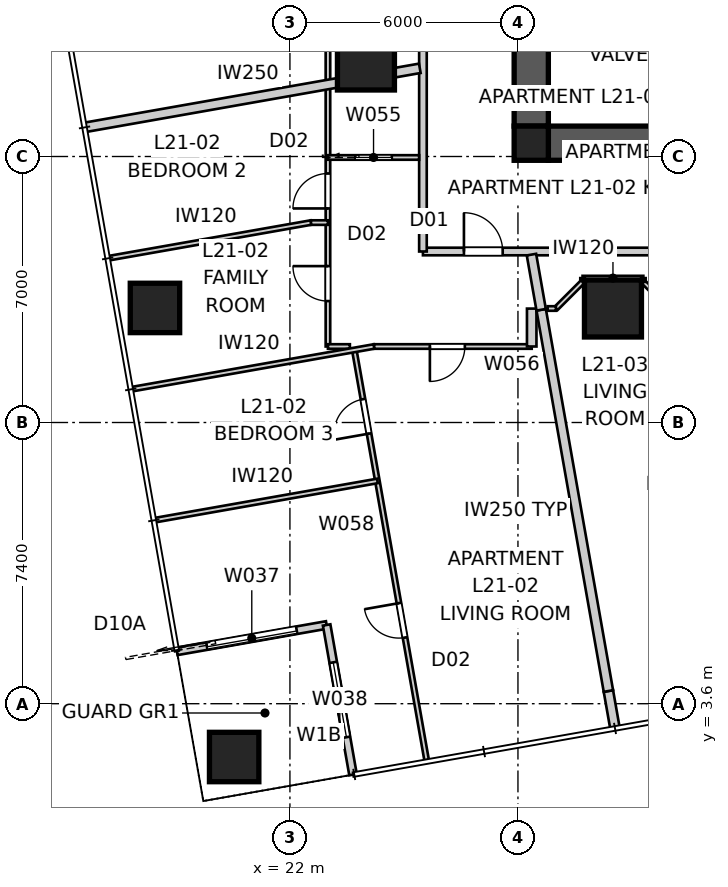
"""IFC4 building model, lengths in metres.
Left out: names, types, materials, properties, quantities, classifications, styles, units other than length and angle.
Written with IfcOpenShell. Run it as: python <this file> out.ifc"""

import sys

from ifc_helpers import new_model, si_unit, direction, frame, frame_2d, origin, origin_2d, place, context, subcontext, project, spatial, polyline, rectangle, outline, extrude, element, fill, save


model = new_model("IFC4")
c1 = context("Model", 3, precision=1e-05, world=origin(), true_north=direction((0.0, 1.0)))
c2 = subcontext(c1, "Body", "Model", "MODEL_VIEW")
j1 = project(units=[si_unit("LENGTHUNIT", "METRE"), si_unit("PLANEANGLEUNIT", "RADIAN")], contexts=[c1])
p1 = place(None, origin())
s1 = spatial("IfcSite", under=j1, at=p1, CompositionType="ELEMENT")
p2 = place(p1, origin())
s2 = spatial("IfcBuilding", under=s1, at=p2, CompositionType="ELEMENT")
p3 = place(p2, frame((0.0, 0.0, 79.4)))
s3 = spatial("IfcBuildingStorey", under=s2, at=p3, CompositionType="ELEMENT", Elevation=79.4)
p4 = place(p3, frame((51.2, 18.35, 0.0), z_axis=(0.0, 0.0, 1.0), x_axis=(-1.0, 0.0, 0.0)))
e1 = element("IfcWall", 1, at=p4, inside=s3, PredefinedType="SHEAR", context=c2, shape_type="SweptSolid", body=[
    extrude(outline(polyline([(0.0, -0.45), (22.4, -0.45), (22.4, -0.025), (22.85, -0.025), (22.85, 0.025), (22.4, 0.025), (22.4, 0.45), (0.0, 0.45), (0.0, 0.025), (-0.45, 0.025), (-0.45, -0.025), (0.0, -0.025), (0.0, -0.45)])), origin(), (0.0, 0.0, 1.0), 3.4),
])
p5 = place(p3, frame((28.35, 41.2, 0.0), z_axis=(0.0, 0.0, 1.0), x_axis=(0.0, -1.0, 0.0)))
e2 = element("IfcWall", 2, at=p5, inside=s3, PredefinedType="SHEAR", context=c2, shape_type="SweptSolid", body=[
    extrude(outline(polyline([(0.0, -0.45), (22.4, -0.45), (22.4, -0.025), (22.85, -0.025), (22.85, 0.025), (22.4, 0.025), (22.4, 0.45), (0.0, 0.45), (0.0, 0.025), (-0.45, 0.025), (-0.45, -0.025), (0.0, -0.025), (0.0, -0.45)])), origin(), (0.0, 0.0, 1.0), 3.4),
])
p6 = place(p5, frame((11.14, 0.0, 0.0)))
e3 = element("IfcOpeningElement", 3, at=p6, cuts=e2, PredefinedType="OPENING", context=c2, shape_type="SweptSolid", body=[
    extrude(rectangle(XDim=1.02, YDim=2.4, at=frame_2d((0.51, 1.2))), frame((0.0, 0.46, 0.0), z_axis=(0.0, -1.0, 0.0), x_axis=(1.0, 0.0, 0.0)), (0.0, 0.0, 1.0), 0.92),
])
p7 = place(p3, frame((28.35, 18.35, 0.0), z_axis=(0.0, 0.0, 1.0), x_axis=(1.0, 0.0, 0.0)))
e4 = element("IfcColumn", 4, at=p7, inside=s3, PredefinedType="COLUMN", context=c2, shape_type="SweptSolid", body=[
    extrude(rectangle(XDim=0.9, YDim=0.9, at=origin_2d()), origin(), (0.0, 0.0, 1.0), 3.4),
])
for number, where, z_axis, x_axis in (
    (5, (20.532, 2.197, -0.15), (0.0, 0.0, 1.0), (1.0, 0.0, 0.0)),
    (6, (18.448, 14.015, -0.15), (0.0, 0.0, 1.0), (1.0, 0.0, 0.0)),
):
    element("IfcColumn", number, at=place(p3, frame(where, z_axis=z_axis, x_axis=x_axis)), inside=s3, PredefinedType="COLUMN", context=c2, shape_type="SweptSolid", body=[
        extrude(rectangle(XDim=1.3, YDim=1.3, at=origin_2d()), origin(), (0.0, 0.0, 1.0), 3.55),
    ])
for number, where, z_axis, x_axis in (
    (7, (24.0, 20.5, 0.0), (0.0, 0.0, 1.0), (1.0, 0.0, 0.0)),
    (8, (30.5, 14.0, 0.0), (0.0, 0.0, 1.0), (1.0, 0.0, 0.0)),
):
    element("IfcColumn", number, at=place(p3, frame(where, z_axis=z_axis, x_axis=x_axis)), inside=s3, PredefinedType="COLUMN", context=c2, shape_type="SweptSolid", body=[
        extrude(rectangle(XDim=1.5, YDim=1.5, at=origin_2d()), origin(), (0.0, 0.0, 1.0), 3.4),
    ])
p8 = place(p3, frame((19.026, 4.978, 0.0), z_axis=(0.0, 0.0, 1.0), x_axis=(0.984808127031, 0.173646056486, 0.0)))
e9 = element("IfcWall", 9, at=p8, inside=s3, PredefinedType="SOLIDWALL", context=c2, shape_type="SweptSolid", body=[
    extrude(rectangle(XDim=4.0, YDim=0.2, at=frame_2d((2.0, 0.0))), origin(), (0.0, 0.0, 1.0), 3.25),
])
p9 = place(p8, frame((0.8, 0.0, 0.0)))
e10 = element("IfcOpeningElement", 10, at=p9, cuts=e9, PredefinedType="OPENING", context=c2, shape_type="SweptSolid", body=[
    extrude(rectangle(XDim=2.4, YDim=2.1, at=frame_2d((1.2, 1.05))), frame((0.0, 0.11, 0.0), z_axis=(0.0, -1.0, 0.0), x_axis=(1.0, 0.0, 0.0)), (0.0, 0.0, 1.0), 0.22),
])
p10 = place(p3, frame((22.966, 5.672, 0.0), z_axis=(0.0, 0.0, 1.0), x_axis=(0.173646056486, -0.984808127031, 0.0)))
e11 = element("IfcWall", 11, at=p10, inside=s3, PredefinedType="SOLIDWALL", context=c2, shape_type="SweptSolid", body=[
    extrude(rectangle(XDim=4.0, YDim=0.2, at=frame_2d((2.0, 0.0))), origin(), (0.0, 0.0, 1.0), 3.25),
])
p11 = place(p10, frame((1.0, 0.0, 0.45)))
e12 = element("IfcOpeningElement", 12, at=p11, cuts=e11, PredefinedType="OPENING", context=c2, shape_type="SweptSolid", body=[
    extrude(rectangle(XDim=2.0, YDim=1.8, at=frame_2d((1.0, 0.9))), frame((0.0, 0.11, 0.0), z_axis=(0.0, -1.0, 0.0), x_axis=(1.0, 0.0, 0.0)), (0.0, 0.0, 1.0), 0.22),
])
p12 = place(p3, frame((25.5, 15.5, 0.0), z_axis=(0.0, 0.0, 1.0), x_axis=(1.0, 0.0, 0.0)))
e13 = element("IfcWall", 13, at=p12, inside=s3, PredefinedType="PARTITIONING", context=c2, shape_type="SweptSolid", body=[
    extrude(rectangle(XDim=29.0, YDim=0.2, at=frame_2d((14.5, 0.0))), origin(), (0.0, 0.0, 1.0), 3.25),
])
p13 = place(p12, frame((15.794, 0.0, 0.0)))
e14 = element("IfcOpeningElement", 14, at=p13, cuts=e13, PredefinedType="OPENING", context=c2, shape_type="SweptSolid", body=[
    extrude(rectangle(XDim=1.02, YDim=2.34, at=frame_2d((0.51, 1.17))), frame((0.0, 0.11, 0.0), z_axis=(0.0, -1.0, 0.0), x_axis=(1.0, 0.0, 0.0)), (0.0, 0.0, 1.0), 0.22),
])
p14 = place(p12, frame((6.067, 0.0, 0.0)))
e15 = element("IfcOpeningElement", 15, at=p14, cuts=e13, PredefinedType="OPENING", context=c2, shape_type="SweptSolid", body=[
    extrude(rectangle(XDim=1.02, YDim=2.34, at=frame_2d((0.51, 1.17))), frame((0.0, 0.11, 0.0), z_axis=(0.0, -1.0, 0.0), x_axis=(1.0, 0.0, 0.0)), (0.0, 0.0, 1.0), 0.22),
])
p15 = place(p12, frame((1.079, 0.0, 0.0)))
e16 = element("IfcOpeningElement", 16, at=p15, cuts=e13, PredefinedType="OPENING", context=c2, shape_type="SweptSolid", body=[
    extrude(rectangle(XDim=1.02, YDim=2.34, at=frame_2d((0.51, 1.17))), frame((0.0, 0.11, 0.0), z_axis=(0.0, -1.0, 0.0), x_axis=(1.0, 0.0, 0.0)), (0.0, 0.0, 1.0), 0.22),
])
p16 = place(p3, frame((25.5, 44.5, 0.0), z_axis=(0.0, 0.0, 1.0), x_axis=(0.0, -1.0, 0.0)))
e17 = element("IfcWall", 17, at=p16, inside=s3, PredefinedType="PARTITIONING", context=c2, shape_type="SweptSolid", body=[
    extrude(rectangle(XDim=29.0, YDim=0.2, at=frame_2d((14.5, 0.0))), origin(), (0.0, 0.0, 1.0), 3.25),
])
p17 = place(p16, frame((12.263, 0.0, 0.0)))
e18 = element("IfcOpeningElement", 18, at=p17, cuts=e17, PredefinedType="OPENING", context=c2, shape_type="SweptSolid", body=[
    extrude(rectangle(XDim=1.02, YDim=2.34, at=frame_2d((0.51, 1.17))), frame((0.0, 0.11, 0.0), z_axis=(0.0, -1.0, 0.0), x_axis=(1.0, 0.0, 0.0)), (0.0, 0.0, 1.0), 0.22),
])
p18 = place(p16, frame((2.018, 0.0, 0.0)))
e19 = element("IfcOpeningElement", 19, at=p18, cuts=e17, PredefinedType="OPENING", context=c2, shape_type="SweptSolid", body=[
    extrude(rectangle(XDim=1.02, YDim=2.34, at=frame_2d((0.51, 1.17))), frame((0.0, 0.11, 0.0), z_axis=(0.0, -1.0, 0.0), x_axis=(1.0, 0.0, 0.0)), (0.0, 0.0, 1.0), 0.22),
])
p19 = place(p3, frame((16.595, 18.765, 0.0), z_axis=(0.0, 0.0, 1.0), x_axis=(0.984806596137, 0.173654738504, 0.0)))
e20 = element("IfcWall", 20, at=p19, inside=s3, PredefinedType="PARTITIONING", context=c2, shape_type="SweptSolid", body=[
    extrude(rectangle(XDim=8.958, YDim=0.25, at=frame_2d((4.479, 0.0))), origin(), (0.0, 0.0, 1.0), 3.25),
])
p20 = place(p3, frame((30.554, 2.949, 0.0), z_axis=(0.0, 0.0, 1.0), x_axis=(-0.173813186416, 0.984778643263, 0.0)))
e21 = element("IfcWall", 21, at=p20, inside=s3, PredefinedType="PARTITIONING", context=c2, shape_type="SweptSolid", body=[
    extrude(rectangle(XDim=1.0, YDim=0.25, at=frame_2d((0.5, 0.0))), origin(), (0.0, 0.0, 1.0), 3.25),
])
p21 = place(p3, frame((30.38, 3.934, 0.0), z_axis=(0.0, 0.0, 1.0), x_axis=(-0.173644522411, 0.984808397525, 0.0)))
e22 = element("IfcWall", 22, at=p21, inside=s3, PredefinedType="PARTITIONING", context=c2, shape_type="SweptSolid", body=[
    extrude(rectangle(XDim=10.188, YDim=0.25, at=frame_2d((5.094, 0.0))), origin(), (0.0, 0.0, 1.0), 2.638),
])
p22 = place(p3, frame((28.611, 13.967, 0.0), z_axis=(0.0, 0.0, 1.0), x_axis=(-0.173634105885, 0.984810234143, 0.0)))
e23 = element("IfcWall", 23, at=p22, inside=s3, PredefinedType="PARTITIONING", context=c2, shape_type="SweptSolid", body=[
    extrude(rectangle(XDim=1.474, YDim=0.25, at=frame_2d((0.737, 0.0))), origin(), (0.0, 0.0, 1.0), 3.25),
])
p23 = place(p3, frame((23.0, 13.0, 0.0), z_axis=(0.0, 0.0, 1.0), x_axis=(0.0, 1.0, 0.0)))
e24 = element("IfcWall", 24, at=p23, inside=s3, PredefinedType="PARTITIONING", context=c2, shape_type="SweptSolid", body=[
    extrude(rectangle(XDim=34.0, YDim=0.12, at=frame_2d((17.0, 0.0))), origin(), (0.0, 0.0, 1.0), 2.55),
])
p24 = place(p23, frame((18.848, 0.0, 0.0)))
e25 = element("IfcOpeningElement", 25, at=p24, cuts=e24, PredefinedType="OPENING", context=c2, shape_type="SweptSolid", body=[
    extrude(rectangle(XDim=0.92, YDim=2.34, at=frame_2d((0.46, 1.17))), frame((0.0, 0.07, 0.0), z_axis=(0.0, -1.0, 0.0), x_axis=(1.0, 0.0, 0.0)), (0.0, 0.0, 1.0), 0.14),
])
p25 = place(p23, frame((16.284, 0.0, 0.0)))
e26 = element("IfcOpeningElement", 26, at=p25, cuts=e24, PredefinedType="OPENING", context=c2, shape_type="SweptSolid", body=[
    extrude(rectangle(XDim=0.92, YDim=2.34, at=frame_2d((0.46, 1.17))), frame((0.0, 0.07, 0.0), z_axis=(0.0, -1.0, 0.0), x_axis=(1.0, 0.0, 0.0)), (0.0, 0.0, 1.0), 0.14),
])
p26 = place(p23, frame((29.052, 0.0, 0.0)))
e27 = element("IfcOpeningElement", 27, at=p26, cuts=e24, PredefinedType="OPENING", context=c2, shape_type="SweptSolid", body=[
    extrude(rectangle(XDim=0.92, YDim=2.34, at=frame_2d((0.46, 1.17))), frame((0.0, 0.07, 0.0), z_axis=(0.0, -1.0, 0.0), x_axis=(1.0, 0.0, 0.0)), (0.0, 0.0, 1.0), 0.14),
])
p27 = place(p23, frame((1.196, 0.0, 0.0)))
e28 = element("IfcOpeningElement", 28, at=p27, cuts=e24, PredefinedType="OPENING", context=c2, shape_type="SweptSolid", body=[
    extrude(rectangle(XDim=0.92, YDim=2.34, at=frame_2d((0.46, 1.17))), frame((0.0, 0.07, 0.0), z_axis=(0.0, -1.0, 0.0), x_axis=(1.0, 0.0, 0.0)), (0.0, 0.0, 1.0), 0.14),
])
p28 = place(p23, frame((3.633, 0.0, 0.0)))
e29 = element("IfcOpeningElement", 29, at=p28, cuts=e24, PredefinedType="OPENING", context=c2, shape_type="SweptSolid", body=[
    extrude(rectangle(XDim=0.92, YDim=2.34, at=frame_2d((0.46, 1.17))), frame((0.0, 0.07, 0.0), z_axis=(0.0, -1.0, 0.0), x_axis=(1.0, 0.0, 0.0)), (0.0, 0.0, 1.0), 0.14),
])
p29 = place(p23, frame((23.619, 0.0, 0.0)))
e30 = element("IfcOpeningElement", 30, at=p29, cuts=e24, PredefinedType="OPENING", context=c2, shape_type="SweptSolid", body=[
    extrude(rectangle(XDim=0.96, YDim=2.1, at=frame_2d((0.48, 1.05))), frame((0.0, 0.07, 0.0), z_axis=(0.0, -1.0, 0.0), x_axis=(1.0, 0.0, 0.0)), (0.0, 0.0, 1.0), 0.14),
])
p30 = place(p3, frame((23.0, 17.975, 0.0), z_axis=(0.0, 0.0, 1.0), x_axis=(1.0, 0.0, 0.0)))
e31 = element("IfcWall", 31, at=p30, inside=s3, PredefinedType="PARTITIONING", context=c2, shape_type="SweptSolid", body=[
    extrude(rectangle(XDim=2.4, YDim=0.12, at=frame_2d((1.2, 0.0))), origin(), (0.0, 0.0, 1.0), 3.25),
])
p31 = place(p30, frame((0.72, 0.0, 0.0)))
e32 = element("IfcOpeningElement", 32, at=p31, cuts=e31, PredefinedType="OPENING", context=c2, shape_type="SweptSolid", body=[
    extrude(rectangle(XDim=0.96, YDim=2.1, at=frame_2d((0.48, 1.05))), frame((0.0, 0.07, 0.0), z_axis=(0.0, -1.0, 0.0), x_axis=(1.0, 0.0, 0.0)), (0.0, 0.0, 1.0), 0.14),
])
p32 = place(p3, frame((28.362, 13.0, 0.0), z_axis=(0.0, 0.0, 1.0), x_axis=(-1.0, 0.0, 0.0)))
e33 = element("IfcWall", 33, at=p32, inside=s3, PredefinedType="PARTITIONING", context=c2, shape_type="SweptSolid", body=[
    extrude(rectangle(XDim=4.151, YDim=0.12, at=frame_2d((2.076, 0.0))), origin(), (0.0, 0.0, 1.0), 2.638),
])
p33 = place(p32, frame((1.76, 0.0, 0.0)))
e34 = element("IfcOpeningElement", 34, at=p33, cuts=e33, PredefinedType="OPENING", context=c2, shape_type="SweptSolid", body=[
    extrude(rectangle(XDim=0.92, YDim=2.34, at=frame_2d((0.46, 1.17))), frame((0.0, 0.07, 0.0), z_axis=(0.0, -1.0, 0.0), x_axis=(1.0, 0.0, 0.0)), (0.0, 0.0, 1.0), 0.14),
])
p34 = place(p3, frame((28.362, 13.998, 0.0), z_axis=(0.0, 0.0, 1.0), x_axis=(0.0, -1.0, 0.0)))
e35 = element("IfcWall", 35, at=p34, inside=s3, PredefinedType="PARTITIONING", context=c2, shape_type="SweptSolid", body=[
    extrude(rectangle(XDim=0.998, YDim=0.25, at=frame_2d((0.499, 0.0))), origin(), (0.0, 0.0, 1.0), 3.25),
])
p35 = place(p3, frame((25.597, 2.115, 0.0), z_axis=(0.0, 0.0, 1.0), x_axis=(-0.173639194339, 0.984809336973, 0.0)))
e36 = element("IfcWall", 36, at=p35, inside=s3, PredefinedType="PARTITIONING", context=c2, shape_type="SweptSolid", body=[
    extrude(rectangle(XDim=10.96, YDim=0.12, at=frame_2d((5.48, 0.0))), origin(), (0.0, 0.0, 1.0), 3.25),
])
p36 = place(p35, frame((3.275, 0.0, 0.0)))
e37 = element("IfcOpeningElement", 37, at=p36, cuts=e36, PredefinedType="OPENING", context=c2, shape_type="SweptSolid", body=[
    extrude(rectangle(XDim=0.92, YDim=2.34, at=frame_2d((0.46, 1.17))), frame((0.0, 0.07, 0.0), z_axis=(0.0, -1.0, 0.0), x_axis=(1.0, 0.0, 0.0)), (0.0, 0.0, 1.0), 0.14),
])
p37 = place(p35, frame((8.725, 0.0, 0.0)))
e38 = element("IfcOpeningElement", 38, at=p37, cuts=e36, PredefinedType="OPENING", context=c2, shape_type="SweptSolid", body=[
    extrude(rectangle(XDim=0.92, YDim=2.34, at=frame_2d((0.46, 1.17))), frame((0.0, 0.07, 0.0), z_axis=(0.0, -1.0, 0.0), x_axis=(1.0, 0.0, 0.0)), (0.0, 0.0, 1.0), 0.14),
])
p38 = place(p3, frame((17.85, 11.878, 0.0), z_axis=(0.0, 0.0, 1.0), x_axis=(0.984806762864, 0.173653792983, 0.0)))
e39 = element("IfcWall", 39, at=p38, inside=s3, PredefinedType="PARTITIONING", context=c2, shape_type="SweptSolid", body=[
    extrude(rectangle(XDim=6.459, YDim=0.12, at=frame_2d((3.229, 0.0))), origin(), (0.0, 0.0, 1.0), 2.638),
])
p39 = place(p3, frame((18.458, 8.432, 0.0), z_axis=(0.0, 0.0, 1.0), x_axis=(0.98480923034, 0.173639799116, 0.0)))
e40 = element("IfcWall", 40, at=p39, inside=s3, PredefinedType="PARTITIONING", context=c2, shape_type="SweptSolid", body=[
    extrude(rectangle(XDim=5.933, YDim=0.12, at=frame_2d((2.967, 0.0))), origin(), (0.0, 0.0, 1.0), 3.25),
])
p40 = place(p3, frame((23.0, 16.261, 0.0), z_axis=(0.0, 0.0, 1.0), x_axis=(-1.0, 0.0, 0.0)))
e41 = element("IfcWall", 41, at=p40, inside=s3, PredefinedType="PARTITIONING", context=c2, shape_type="SweptSolid", body=[
    extrude(rectangle(XDim=0.45, YDim=0.12, at=frame_2d((0.225, 0.0))), origin(), (0.0, 0.0, 1.0), 3.25),
])
p41 = place(p3, frame((22.55, 16.261, 0.0), z_axis=(0.0, 0.0, 1.0), x_axis=(-0.984810453076, -0.173632864151, 0.0)))
e42 = element("IfcWall", 42, at=p41, inside=s3, PredefinedType="PARTITIONING", context=c2, shape_type="SweptSolid", body=[
    extrude(rectangle(XDim=5.389, YDim=0.12, at=frame_2d((2.695, 0.0))), origin(), (0.0, 0.0, 1.0), 3.25),
])
p42 = place(p3, frame((32.0, 14.0, 0.0), z_axis=(0.0, 0.0, 1.0), x_axis=(-0.707106781187, 0.707106781187, 0.0)))
e43 = element("IfcWall", 43, at=p42, inside=s3, PredefinedType="PARTITIONING", context=c2, shape_type="SweptSolid", body=[
    extrude(rectangle(XDim=0.99, YDim=0.12, at=frame_2d((0.495, 0.0))), origin(), (0.0, 0.0, 1.0), 3.25),
])
p43 = place(p3, frame((31.3, 14.8, 0.0), z_axis=(0.0, 0.0, 1.0), x_axis=(-1.0, 0.0, 0.0)))
e44 = element("IfcWall", 44, at=p43, inside=s3, PredefinedType="PARTITIONING", context=c2, shape_type="SweptSolid", body=[
    extrude(rectangle(XDim=1.6, YDim=0.12, at=frame_2d((0.8, 0.0))), origin(), (0.0, 0.0, 1.0), 3.25),
])
p44 = place(p3, frame((29.7, 14.7, 0.0), z_axis=(0.0, 0.0, 1.0), x_axis=(-0.707106781187, -0.707106781187, 0.0)))
e45 = element("IfcWall", 45, at=p44, inside=s3, PredefinedType="PARTITIONING", context=c2, shape_type="SweptSolid", body=[
    extrude(rectangle(XDim=0.99, YDim=0.12, at=frame_2d((0.495, 0.0))), origin(), (0.0, 0.0, 1.0), 3.25),
])
p45 = place(p3, frame((29.0, 14.0, 0.0), z_axis=(0.0, 0.0, 1.0), x_axis=(-1.0, 0.0, 0.0)))
e46 = element("IfcWall", 46, at=p45, inside=s3, PredefinedType="PARTITIONING", context=c2, shape_type="SweptSolid", body=[
    extrude(rectangle(XDim=0.219, YDim=0.12, at=frame_2d((0.109, 0.0))), origin(), (0.0, 0.0, 1.0), 3.25),
])
p46 = place(p3, frame((23.0, 13.0, 0.0), z_axis=(0.0, 0.0, 1.0), x_axis=(1.0, 0.0, 0.0)))
e47 = element("IfcWall", 47, at=p46, inside=s3, PredefinedType="PARTITIONING", context=c2, shape_type="SweptSolid", body=[
    extrude(rectangle(XDim=0.578, YDim=0.12, at=frame_2d((0.289, 0.0))), origin(), (0.0, 0.0, 1.0), 3.25),
])
for number, where, z_axis, x_axis in (
    (48, (31.3, 14.8, 0.0), (0.0, 0.0, 1.0), (0.0, -1.0, 0.0)),
    (49, (29.7, 14.8, 0.0), (0.0, 0.0, 1.0), (0.0, -1.0, 0.0)),
):
    element("IfcWall", number, at=place(p3, frame(where, z_axis=z_axis, x_axis=x_axis)), inside=s3, PredefinedType="PARTITIONING", context=c2, shape_type="SweptSolid", body=[
        extrude(rectangle(XDim=0.1, YDim=0.12, at=frame_2d((0.05, 0.0))), origin(), (0.0, 0.0, 1.0), 3.25),
    ])
p47 = place(p9, origin())
e50 = element("IfcDoor", 50, at=p47, inside=s3, OperationType="SLIDING_TO_LEFT", PredefinedType="DOOR", context=c2, shape_type="SweptSolid", body=[
    extrude(rectangle(XDim=2.4, YDim=2.1, at=frame_2d((1.2, 1.05))), frame((0.0, 0.025, 0.0), z_axis=(0.0, -1.0, 0.0), x_axis=(1.0, 0.0, 0.0)), (0.0, 0.0, 1.0), 0.05),
])
fill(e10, e50)
p48 = place(p11, origin())
e51 = element("IfcWindow", 51, at=p48, inside=s3, PartitioningType="SINGLE_PANEL", PredefinedType="WINDOW", context=c2, shape_type="SweptSolid", body=[
    extrude(rectangle(XDim=2.0, YDim=1.8, at=frame_2d((1.0, 0.9))), frame((0.0, 0.03, 0.0), z_axis=(0.0, -1.0, 0.0), x_axis=(1.0, 0.0, 0.0)), (0.0, 0.0, 1.0), 0.06),
])
fill(e12, e51)
p49 = place(p15, origin())
e52 = element("IfcDoor", 52, at=p49, inside=s3, OperationType="SINGLE_SWING_LEFT", PredefinedType="DOOR", context=c2, shape_type="SweptSolid", body=[
    extrude(rectangle(XDim=1.02, YDim=2.34, at=frame_2d((0.51, 1.17))), frame((0.0, 0.025, 0.0), z_axis=(0.0, -1.0, 0.0), x_axis=(1.0, 0.0, 0.0)), (0.0, 0.0, 1.0), 0.05),
])
fill(e16, e52)
p50 = place(p33, origin())
e53 = element("IfcDoor", 53, at=p50, inside=s3, OperationType="SINGLE_SWING_RIGHT", PredefinedType="DOOR", context=c2, shape_type="SweptSolid", body=[
    extrude(rectangle(XDim=0.92, YDim=2.34, at=frame_2d((0.46, 1.17))), frame((0.0, 0.025, 0.0), z_axis=(0.0, -1.0, 0.0), x_axis=(1.0, 0.0, 0.0)), (0.0, 0.0, 1.0), 0.05),
])
fill(e34, e53)
p51 = place(p27, origin())
e54 = element("IfcDoor", 54, at=p51, inside=s3, OperationType="SINGLE_SWING_RIGHT", PredefinedType="DOOR", context=c2, shape_type="SweptSolid", body=[
    extrude(rectangle(XDim=0.92, YDim=2.34, at=frame_2d((0.46, 1.17))), frame((0.0, 0.025, 0.0), z_axis=(0.0, -1.0, 0.0), x_axis=(1.0, 0.0, 0.0)), (0.0, 0.0, 1.0), 0.05),
])
fill(e28, e54)
p52 = place(p31, origin())
e55 = element("IfcDoor", 55, at=p52, inside=s3, OperationType="SLIDING_TO_LEFT", PredefinedType="DOOR", context=c2, shape_type="SweptSolid", body=[
    extrude(rectangle(XDim=0.96, YDim=2.1, at=frame_2d((0.48, 1.05))), frame((0.0, 0.025, 0.0), z_axis=(0.0, -1.0, 0.0), x_axis=(1.0, 0.0, 0.0)), (0.0, 0.0, 1.0), 0.05),
])
fill(e32, e55)
p53 = place(p28, origin())
e56 = element("IfcDoor", 56, at=p53, inside=s3, OperationType="SINGLE_SWING_LEFT", PredefinedType="DOOR", context=c2, shape_type="SweptSolid", body=[
    extrude(rectangle(XDim=0.92, YDim=2.34, at=frame_2d((0.46, 1.17))), frame((0.0, 0.025, 0.0), z_axis=(0.0, -1.0, 0.0), x_axis=(1.0, 0.0, 0.0)), (0.0, 0.0, 1.0), 0.05),
])
fill(e29, e56)
p54 = place(p36, origin())
e57 = element("IfcDoor", 57, at=p54, inside=s3, OperationType="SINGLE_SWING_RIGHT", PredefinedType="DOOR", context=c2, shape_type="SweptSolid", body=[
    extrude(rectangle(XDim=0.92, YDim=2.34, at=frame_2d((0.46, 1.17))), frame((0.0, 0.025, 0.0), z_axis=(0.0, -1.0, 0.0), x_axis=(1.0, 0.0, 0.0)), (0.0, 0.0, 1.0), 0.05),
])
fill(e37, e57)
p55 = place(p37, origin())
e58 = element("IfcDoor", 58, at=p55, inside=s3, OperationType="SINGLE_SWING_LEFT", PredefinedType="DOOR", context=c2, shape_type="SweptSolid", body=[
    extrude(rectangle(XDim=0.92, YDim=2.34, at=frame_2d((0.46, 1.17))), frame((0.0, 0.025, 0.0), z_axis=(0.0, -1.0, 0.0), x_axis=(1.0, 0.0, 0.0)), (0.0, 0.0, 1.0), 0.05),
])
fill(e38, e58)
save(model, sys.argv[1])
